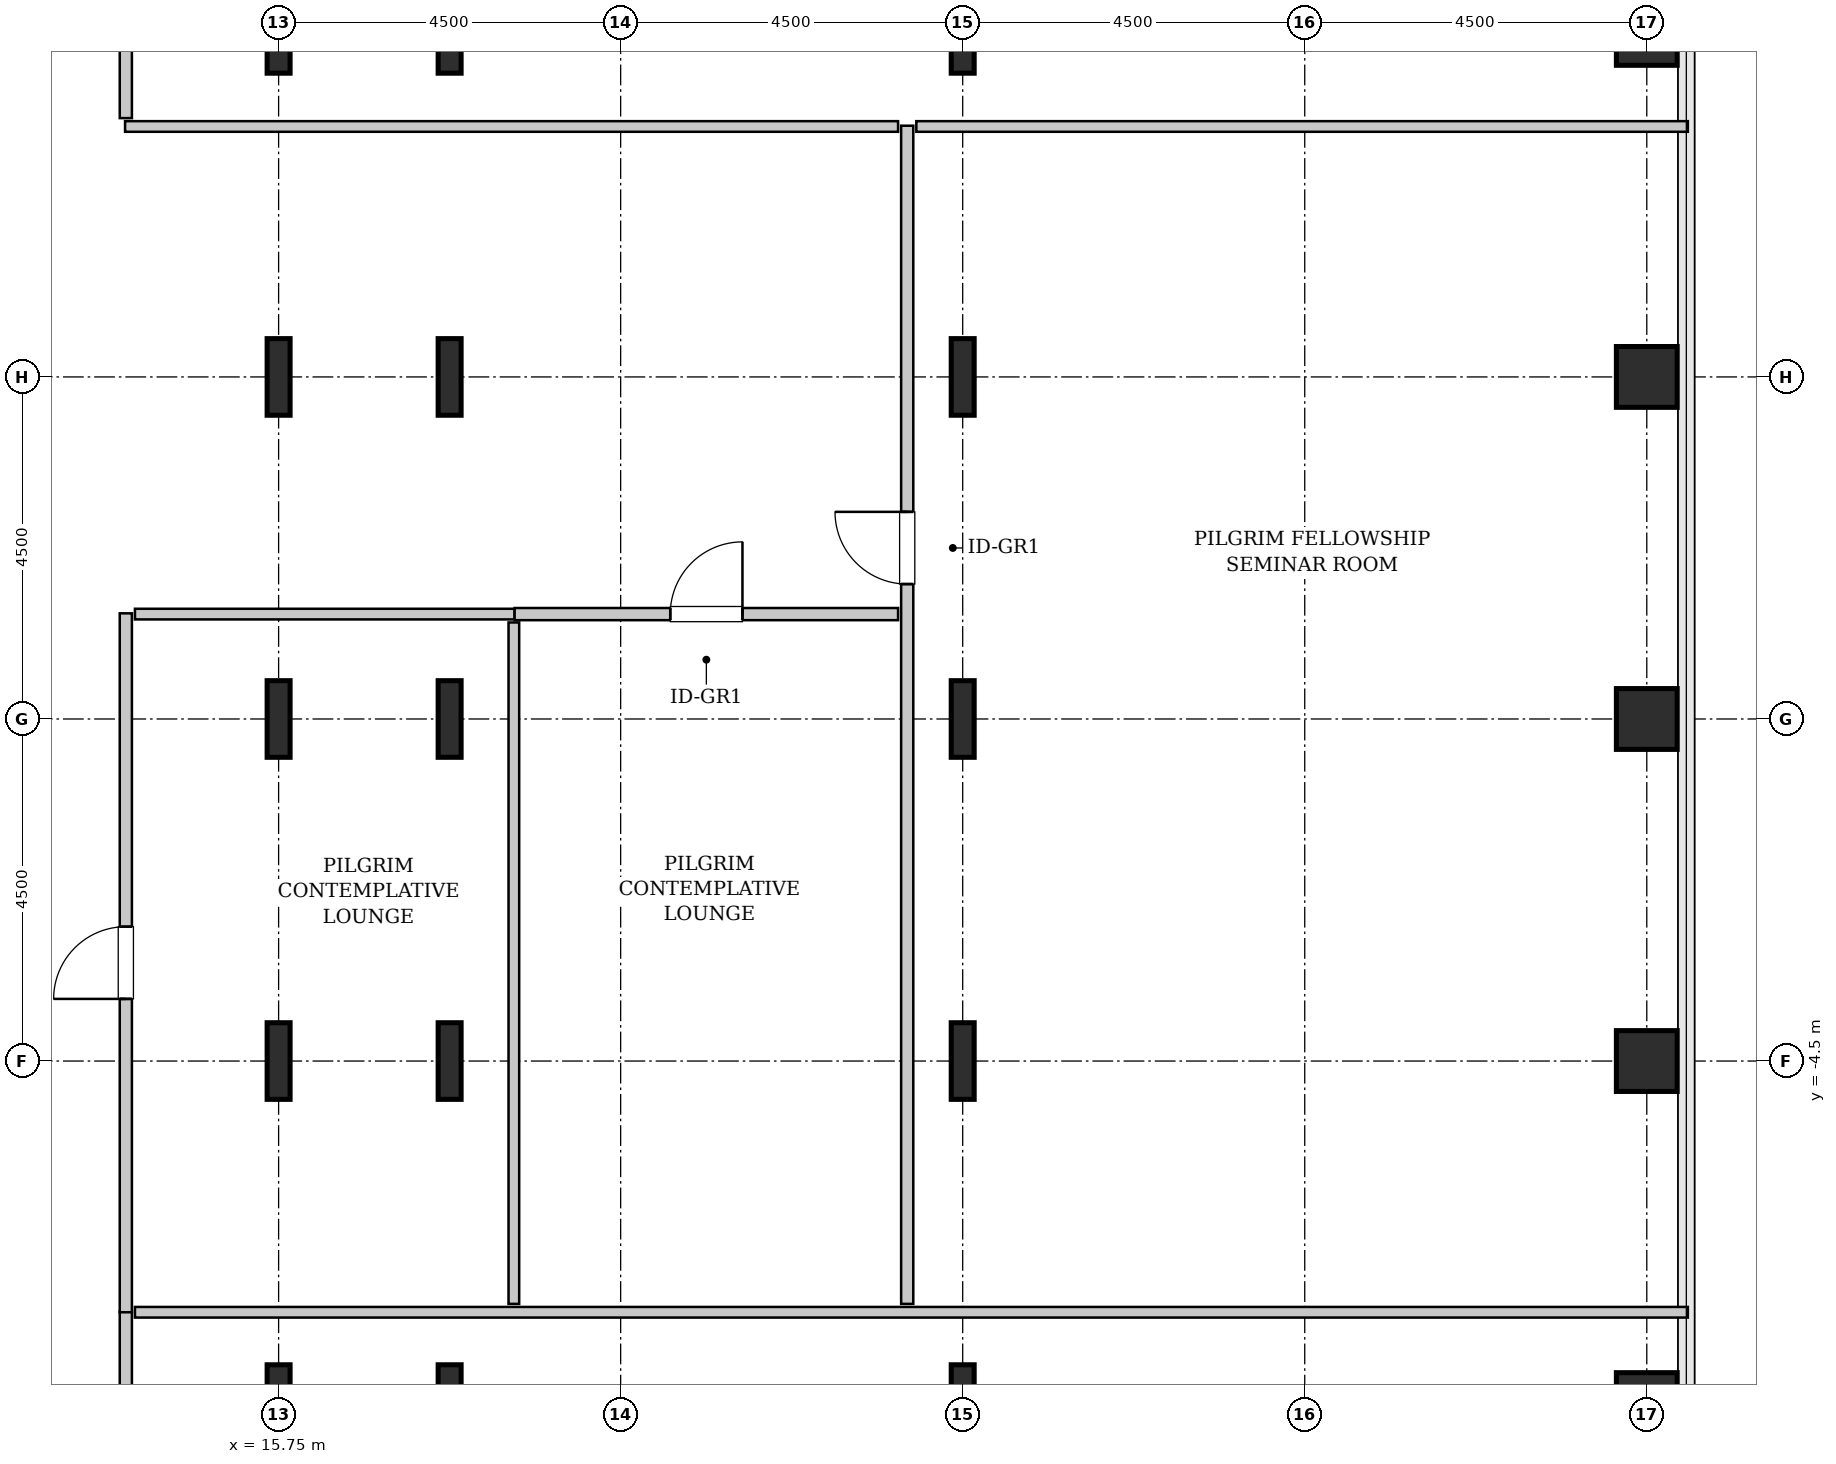
"""IFC4 building model, lengths in metres.
Left out: names, types, materials, properties, quantities, classifications, styles, units other than length and angle.
Written with IfcOpenShell. Run it as: python <this file> out.ifc"""

import sys

from ifc_helpers import new_model, si_unit, direction, frame, frame_2d, origin, origin_2d, place, context, subcontext, project, spatial, rectangle, hollow_rectangle, i_section, extrude, source, transform, mapped, element, fill, save


model = new_model("IFC4")
c1 = context("Model", 3, precision=1e-05, world=origin(), true_north=direction((0.0, 1.0)))
c2 = subcontext(c1, "Body", "Model", "MODEL_VIEW")
j1 = project(units=[si_unit("LENGTHUNIT", "METRE"), si_unit("PLANEANGLEUNIT", "RADIAN")], contexts=[c1])
p1 = place(None, origin())
s1 = spatial("IfcSite", under=j1, at=p1, CompositionType="ELEMENT")
p2 = place(p1, origin())
s2 = spatial("IfcBuilding", under=s1, at=p2, CompositionType="ELEMENT")
p3 = place(p2, frame((0.0, 0.0, 121.2)))
s3 = spatial("IfcBuildingStorey", under=s2, at=p3, CompositionType="ELEMENT", Elevation=121.2)
m1 = source(origin(), c2, "Body", "SweptSolid", [
    extrude(i_section(OverallWidth=0.302, OverallDepth=1.008, WebThickness=0.021, FlangeThickness=0.04, FilletRadius=0.03, at=origin_2d()), origin(), (0.0, 0.0, 1.0), 3.8),
])
for number, where, z_axis, x_axis in (
    (1, (15.75, -9.0, 0.0), (0.0, 0.0, 1.0), (1.0, 0.0, 0.0)),
    (2, (15.75, -4.5, 0.0), (0.0, 0.0, 1.0), (1.0, 0.0, 0.0)),
    (3, (15.75, 0.0, 0.0), (0.0, 0.0, 1.0), (1.0, 0.0, 0.0)),
    (4, (15.75, 4.5, 0.0), (0.0, 0.0, 1.0), (1.0, 0.0, 0.0)),
    (5, (15.75, 9.0, 0.0), (0.0, 0.0, 1.0), (1.0, 0.0, 0.0)),
    (6, (18.0, -9.0, 0.0), (0.0, 0.0, 1.0), (1.0, 0.0, 0.0)),
    (7, (18.0, -4.5, 0.0), (0.0, 0.0, 1.0), (1.0, 0.0, 0.0)),
    (8, (18.0, 0.0, 0.0), (0.0, 0.0, 1.0), (1.0, 0.0, 0.0)),
    (9, (18.0, 4.5, 0.0), (0.0, 0.0, 1.0), (1.0, 0.0, 0.0)),
    (10, (18.0, 9.0, 0.0), (0.0, 0.0, 1.0), (1.0, 0.0, 0.0)),
    (11, (24.75, -9.0, 0.0), (0.0, 0.0, 1.0), (1.0, 0.0, 0.0)),
    (12, (24.75, -4.5, 0.0), (0.0, 0.0, 1.0), (1.0, 0.0, 0.0)),
    (13, (24.75, 0.0, 0.0), (0.0, 0.0, 1.0), (1.0, 0.0, 0.0)),
    (14, (24.75, 4.5, 0.0), (0.0, 0.0, 1.0), (1.0, 0.0, 0.0)),
    (15, (24.75, 9.0, 0.0), (0.0, 0.0, 1.0), (1.0, 0.0, 0.0)),
):
    element("IfcColumn", number, at=place(p3, frame(where, z_axis=z_axis, x_axis=x_axis)), inside=s3, PredefinedType="COLUMN", context=c2, shape_type="MappedRepresentation", body=[
        mapped(m1, transform((0.0, 0.0, 0.0), x_axis=(1.0, 0.0, 0.0), y_axis=(0.0, 1.0, 0.0), z_axis=(0.0, 0.0, 1.0), scale=1.0)),
    ])
m2 = source(origin(), c2, "Body", "SweptSolid", [
    extrude(hollow_rectangle(XDim=0.8, YDim=0.8, WallThickness=0.04, InnerFilletRadius=0.04, OuterFilletRadius=0.08, at=origin_2d()), origin(), (0.0, 0.0, 1.0), 3.8),
])
for number, where, z_axis, x_axis in (
    (16, (33.75, -9.0, 0.0), (0.0, 0.0, 1.0), (1.0, 0.0, 0.0)),
    (17, (33.75, -4.5, 0.0), (0.0, 0.0, 1.0), (1.0, 0.0, 0.0)),
    (18, (33.75, 0.0, 0.0), (0.0, 0.0, 1.0), (1.0, 0.0, 0.0)),
    (19, (33.75, 4.5, 0.0), (0.0, 0.0, 1.0), (1.0, 0.0, 0.0)),
    (20, (33.75, 9.0, 0.0), (0.0, 0.0, 1.0), (1.0, 0.0, 0.0)),
):
    element("IfcColumn", number, at=place(p3, frame(where, z_axis=z_axis, x_axis=x_axis)), inside=s3, PredefinedType="COLUMN", context=c2, shape_type="MappedRepresentation", body=[
        mapped(m2, transform((0.0, 0.0, 0.0), x_axis=(1.0, 0.0, 0.0), y_axis=(0.0, 1.0, 0.0), z_axis=(0.0, 0.0, 1.0), scale=1.0)),
    ])
m3 = source(origin(), c2, "Body", "SweptSolid", [
    extrude(rectangle(XDim=15.245, YDim=0.16, at=frame_2d((7.623, 0.0))), origin(), (0.0, 0.0, 1.0), 3.535),
])
p4 = place(p3, frame((13.74, -23.04, 0.0), z_axis=(0.0, 0.0, 1.0), x_axis=(0.0, 1.0, 0.0)))
e21 = element("IfcWall", 21, at=p4, inside=s3, PredefinedType="PARTITIONING", context=c2, shape_type="MappedRepresentation", body=[
    mapped(m3, transform((0.0, 0.0, 0.0), x_axis=(1.0, 0.0, 0.0), y_axis=(0.0, 1.0, 0.0), z_axis=(0.0, 0.0, 1.0), scale=1.0)),
])
p5 = place(p4, frame((12.913, 0.0, 0.0)))
e22 = element("IfcOpeningElement", 22, at=p5, cuts=e21, PredefinedType="OPENING", context=c2, shape_type="SweptSolid", body=[
    extrude(rectangle(XDim=0.95, YDim=2.1, at=frame_2d((0.475, 1.05))), frame((0.0, 0.09, 0.0), z_axis=(0.0, -1.0, 0.0), x_axis=(1.0, 0.0, 0.0)), (0.0, 0.0, 1.0), 0.18),
])
m4 = source(origin(), c2, "Body", "SweptSolid", [
    extrude(rectangle(XDim=20.43, YDim=0.14, at=frame_2d((10.215, 0.0))), origin(), (0.0, 0.0, 1.0), 3.535),
])
p6 = place(p3, frame((13.86, -7.805, 0.0), z_axis=(0.0, 0.0, 1.0), x_axis=(1.0, 0.0, 0.0)))
e23 = element("IfcWall", 23, at=p6, inside=s3, PredefinedType="PARTITIONING", context=c2, shape_type="MappedRepresentation", body=[
    mapped(m4, transform((0.0, 0.0, 0.0), x_axis=(1.0, 0.0, 0.0), y_axis=(0.0, 1.0, 0.0), z_axis=(0.0, 0.0, 1.0), scale=1.0)),
])
m5 = source(origin(), c2, "Body", "SweptSolid", [
    extrude(rectangle(XDim=15.5, YDim=0.16, at=frame_2d((7.75, 0.0))), origin(), (0.0, 0.0, 1.0), 3.535),
])
p7 = place(p3, frame((24.02, -7.695, 0.0), z_axis=(0.0, 0.0, 1.0), x_axis=(0.0, 1.0, 0.0)))
e24 = element("IfcWall", 24, at=p7, inside=s3, PredefinedType="PARTITIONING", context=c2, shape_type="MappedRepresentation", body=[
    mapped(m5, transform((0.0, 0.0, 0.0), x_axis=(1.0, 0.0, 0.0), y_axis=(0.0, 1.0, 0.0), z_axis=(0.0, 0.0, 1.0), scale=1.0)),
])
p8 = place(p7, frame((9.47, 0.0, 0.0)))
e25 = element("IfcOpeningElement", 25, at=p8, cuts=e24, PredefinedType="OPENING", context=c2, shape_type="SweptSolid", body=[
    extrude(rectangle(XDim=0.95, YDim=2.1, at=frame_2d((0.475, 1.05))), frame((0.0, 0.09, 0.0), z_axis=(0.0, -1.0, 0.0), x_axis=(1.0, 0.0, 0.0)), (0.0, 0.0, 1.0), 0.18),
])
m6 = source(origin(), c2, "Body", "SweptSolid", [
    extrude(rectangle(XDim=10.17, YDim=0.14, at=frame_2d((5.085, 0.0))), origin(), (0.0, 0.0, 1.0), 3.535),
])
p9 = place(p3, frame((13.73, 7.795, 0.0), z_axis=(0.0, 0.0, 1.0), x_axis=(1.0, 0.0, 0.0)))
e26 = element("IfcWall", 26, at=p9, inside=s3, PredefinedType="PARTITIONING", context=c2, shape_type="MappedRepresentation", body=[
    mapped(m6, transform((0.0, 0.0, 0.0), x_axis=(1.0, 0.0, 0.0), y_axis=(0.0, 1.0, 0.0), z_axis=(0.0, 0.0, 1.0), scale=1.0)),
])
m7 = source(origin(), c2, "Body", "SweptSolid", [
    extrude(rectangle(XDim=10.15, YDim=0.14, at=frame_2d((5.075, 0.0))), origin(), (0.0, 0.0, 1.0), 3.535),
])
p10 = place(p3, frame((24.14, 7.795, 0.0), z_axis=(0.0, 0.0, 1.0), x_axis=(1.0, 0.0, 0.0)))
e27 = element("IfcWall", 27, at=p10, inside=s3, PredefinedType="PARTITIONING", context=c2, shape_type="MappedRepresentation", body=[
    mapped(m7, transform((0.0, 0.0, 0.0), x_axis=(1.0, 0.0, 0.0), y_axis=(0.0, 1.0, 0.0), z_axis=(0.0, 0.0, 1.0), scale=1.0)),
])
m8 = source(origin(), c2, "Body", "SweptSolid", [
    extrude(rectangle(XDim=9.195, YDim=0.16, at=frame_2d((4.597, 0.0))), origin(), (0.0, 0.0, 1.0), 3.535),
])
p11 = place(p3, frame((13.74, -7.805, 0.0), z_axis=(0.0, 0.0, 1.0), x_axis=(0.0, 1.0, 0.0)))
e28 = element("IfcWall", 28, at=p11, inside=s3, PredefinedType="PARTITIONING", context=c2, shape_type="MappedRepresentation", body=[
    mapped(m8, transform((0.0, 0.0, 0.0), x_axis=(1.0, 0.0, 0.0), y_axis=(0.0, 1.0, 0.0), z_axis=(0.0, 0.0, 1.0), scale=1.0)),
])
p12 = place(p11, frame((4.123, 0.0, 0.0)))
e29 = element("IfcOpeningElement", 29, at=p12, cuts=e28, PredefinedType="OPENING", context=c2, shape_type="SweptSolid", body=[
    extrude(rectangle(XDim=0.95, YDim=2.1, at=frame_2d((0.475, 1.05))), frame((0.0, 0.09, 0.0), z_axis=(0.0, -1.0, 0.0), x_axis=(1.0, 0.0, 0.0)), (0.0, 0.0, 1.0), 0.18),
])
m9 = source(origin(), c2, "Body", "SweptSolid", [
    extrude(rectangle(XDim=4.995, YDim=0.14, at=frame_2d((2.498, 0.0))), origin(), (0.0, 0.0, 1.0), 3.535),
])
p13 = place(p3, frame((13.86, 1.38, 0.0), z_axis=(0.0, 0.0, 1.0), x_axis=(1.0, 0.0, 0.0)))
e30 = element("IfcWall", 30, at=p13, inside=s3, PredefinedType="PARTITIONING", context=c2, shape_type="MappedRepresentation", body=[
    mapped(m9, transform((0.0, 0.0, 0.0), x_axis=(1.0, 0.0, 0.0), y_axis=(0.0, 1.0, 0.0), z_axis=(0.0, 0.0, 1.0), scale=1.0)),
])
m10 = source(origin(), c2, "Body", "SweptSolid", [
    extrude(rectangle(XDim=8.965, YDim=0.14, at=frame_2d((4.482, 0.0))), origin(), (0.0, 0.0, 1.0), 3.535),
])
p14 = place(p3, frame((18.845, -7.695, 0.0), z_axis=(0.0, 0.0, 1.0), x_axis=(0.0, 1.0, 0.0)))
e31 = element("IfcWall", 31, at=p14, inside=s3, PredefinedType="PARTITIONING", context=c2, shape_type="MappedRepresentation", body=[
    mapped(m10, transform((0.0, 0.0, 0.0), x_axis=(1.0, 0.0, 0.0), y_axis=(0.0, 1.0, 0.0), z_axis=(0.0, 0.0, 1.0), scale=1.0)),
])
m11 = source(origin(), c2, "Body", "SweptSolid", [
    extrude(rectangle(XDim=5.045, YDim=0.16, at=frame_2d((2.522, 0.0))), origin(), (0.0, 0.0, 1.0), 3.535),
])
p15 = place(p3, frame((18.855, 1.38, 0.0), z_axis=(0.0, 0.0, 1.0), x_axis=(1.0, 0.0, 0.0)))
e32 = element("IfcWall", 32, at=p15, inside=s3, PredefinedType="PARTITIONING", context=c2, shape_type="MappedRepresentation", body=[
    mapped(m11, transform((0.0, 0.0, 0.0), x_axis=(1.0, 0.0, 0.0), y_axis=(0.0, 1.0, 0.0), z_axis=(0.0, 0.0, 1.0), scale=1.0)),
])
p16 = place(p15, frame((2.048, 0.0, 0.0)))
e33 = element("IfcOpeningElement", 33, at=p16, cuts=e32, PredefinedType="OPENING", context=c2, shape_type="SweptSolid", body=[
    extrude(rectangle(XDim=0.95, YDim=2.1, at=frame_2d((0.475, 1.05))), frame((0.0, 0.09, 0.0), z_axis=(0.0, -1.0, 0.0), x_axis=(1.0, 0.0, 0.0)), (0.0, 0.0, 1.0), 0.18),
])
m12 = source(origin(), c2, "Body", "SweptSolid", [
    extrude(rectangle(XDim=15.135, YDim=0.16, at=frame_2d((7.567, 0.0))), origin(), (0.0, 0.0, 1.0), 3.535),
])
p17 = place(p3, frame((13.74, 7.905, 0.0), z_axis=(0.0, 0.0, 1.0), x_axis=(0.0, 1.0, 0.0)))
e34 = element("IfcWall", 34, at=p17, inside=s3, PredefinedType="PARTITIONING", context=c2, shape_type="MappedRepresentation", body=[
    mapped(m12, transform((0.0, 0.0, 0.0), x_axis=(1.0, 0.0, 0.0), y_axis=(0.0, 1.0, 0.0), z_axis=(0.0, 0.0, 1.0), scale=1.0)),
])
p18 = place(p17, frame((1.327, 0.0, 0.0)))
e35 = element("IfcOpeningElement", 35, at=p18, cuts=e34, PredefinedType="OPENING", context=c2, shape_type="SweptSolid", body=[
    extrude(rectangle(XDim=0.95, YDim=2.1, at=frame_2d((0.475, 1.05))), frame((0.0, 0.09, 0.0), z_axis=(0.0, -1.0, 0.0), x_axis=(1.0, 0.0, 0.0)), (0.0, 0.0, 1.0), 0.18),
])
m13 = source(origin(), c2, "Body", "SweptSolid", [
    extrude(rectangle(XDim=0.95, YDim=2.1, at=frame_2d((0.475, 1.05))), frame((0.0, 0.025, 0.0), z_axis=(0.0, -1.0, 0.0), x_axis=(1.0, 0.0, 0.0)), (0.0, 0.0, 1.0), 0.05),
])
p19 = place(p8, origin())
e36 = element("IfcDoor", 36, at=p19, inside=s3, OperationType="SINGLE_SWING_RIGHT", PredefinedType="DOOR", context=c2, shape_type="MappedRepresentation", body=[
    mapped(m13, transform((0.0, 0.0, 0.0), x_axis=(1.0, 0.0, 0.0), y_axis=(0.0, 1.0, 0.0), z_axis=(0.0, 0.0, 1.0), scale=1.0)),
])
fill(e25, e36)
p20 = place(p12, origin())
e37 = element("IfcDoor", 37, at=p20, inside=s3, OperationType="SINGLE_SWING_LEFT", PredefinedType="DOOR", context=c2, shape_type="MappedRepresentation", body=[
    mapped(m13, transform((0.0, 0.0, 0.0), x_axis=(1.0, 0.0, 0.0), y_axis=(0.0, 1.0, 0.0), z_axis=(0.0, 0.0, 1.0), scale=1.0)),
])
fill(e29, e37)
p21 = place(p16, origin())
e38 = element("IfcDoor", 38, at=p21, inside=s3, OperationType="SINGLE_SWING_RIGHT", PredefinedType="DOOR", context=c2, shape_type="MappedRepresentation", body=[
    mapped(m13, transform((0.0, 0.0, 0.0), x_axis=(1.0, 0.0, 0.0), y_axis=(0.0, 1.0, 0.0), z_axis=(0.0, 0.0, 1.0), scale=1.0)),
])
fill(e33, e38)
save(model, sys.argv[1])
